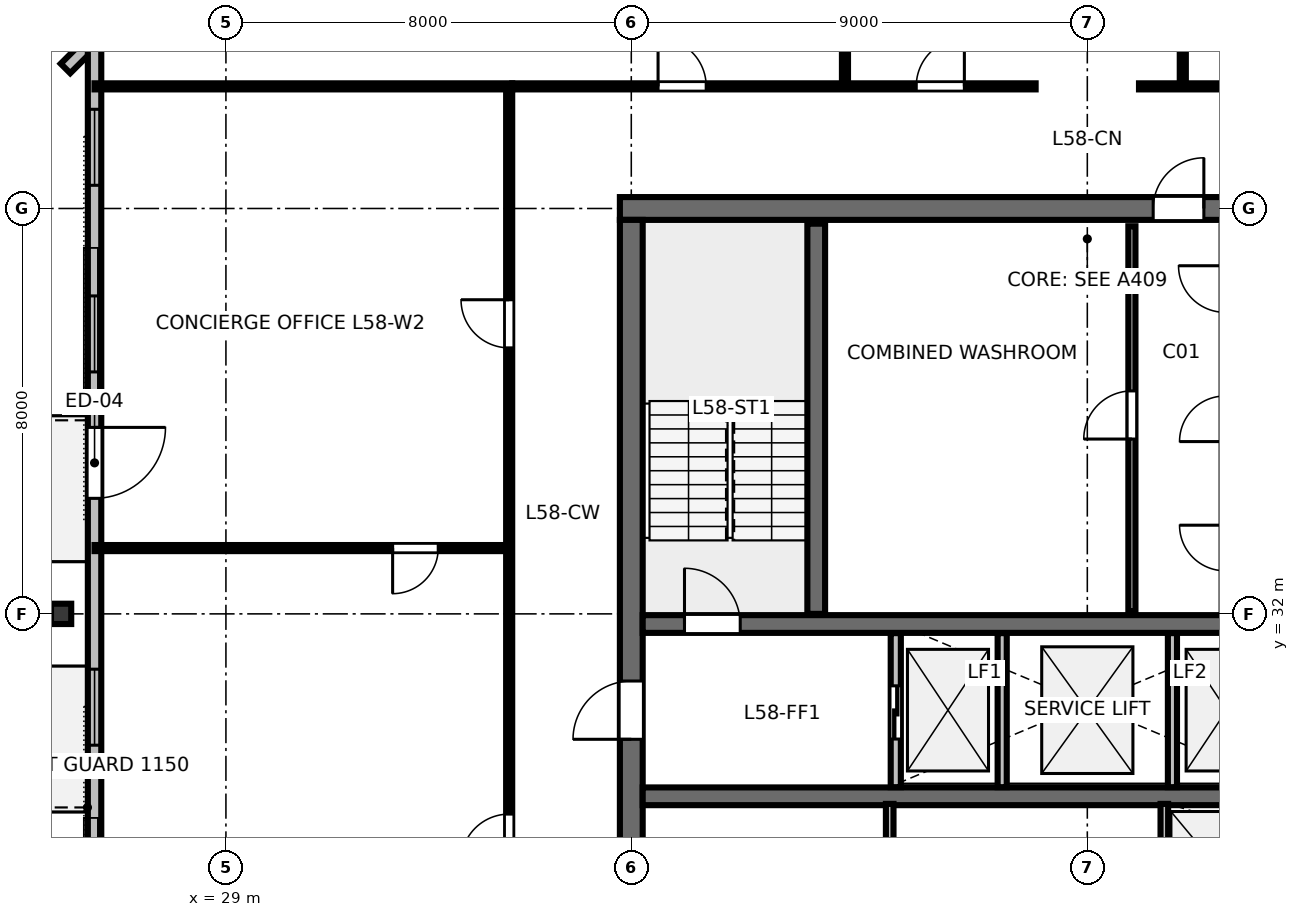
"""IFC4 building model, lengths in metres.
Left out: names, types, materials, properties, quantities, classifications, styles, units other than length and angle.
Written with IfcOpenShell. Run it as: python <this file> out.ifc"""

import sys

from ifc_helpers import new_model, si_unit, direction, frame, frame_2d, origin, origin_2d, place, context, subcontext, project, spatial, rectangle, i_section, extrude, element, fill, save


model = new_model("IFC4")
c1 = context("Model", 3, precision=1e-05, world=origin(), true_north=direction((0.0, 1.0)))
c2 = subcontext(c1, "Body", "Model", "MODEL_VIEW")
j1 = project(units=[si_unit("LENGTHUNIT", "METRE"), si_unit("PLANEANGLEUNIT", "RADIAN")], contexts=[c1])
p1 = place(None, origin())
s1 = spatial("IfcSite", under=j1, at=p1, CompositionType="ELEMENT")
p2 = place(p1, origin())
s2 = spatial("IfcBuilding", under=s1, at=p2, CompositionType="ELEMENT")
p3 = place(p2, frame((0.0, 0.0, 220.2)))
s3 = spatial("IfcBuildingStorey", under=s2, at=p3, CompositionType="ELEMENT", Elevation=220.2)
p4 = place(p3, frame((36.775, 40.0, 0.0), z_axis=(0.0, 0.0, 1.0), x_axis=(1.0, 0.0, 0.0)))
e1 = element("IfcWall", 1, at=p4, inside=s3, PredefinedType="SHEAR", context=c2, shape_type="SweptSolid", body=[
    extrude(rectangle(XDim=18.45, YDim=0.45, at=frame_2d((9.225, 0.0))), origin(), (0.0, 0.0, 1.0), 3.36),
])
p5 = place(p4, frame((10.525, 0.0, 0.0)))
e2 = element("IfcOpeningElement", 2, at=p5, cuts=e1, PredefinedType="OPENING", context=c2, shape_type="SweptSolid", body=[
    extrude(rectangle(XDim=1.0, YDim=2.15, at=frame_2d((0.5, 1.075))), frame((0.0, 0.235, 0.0), z_axis=(0.0, -1.0, 0.0), x_axis=(1.0, 0.0, 0.0)), (0.0, 0.0, 1.0), 0.47),
])
p6 = place(p3, frame((37.0, 24.225, 0.0), z_axis=(0.0, 0.0, 1.0), x_axis=(0.0, 1.0, 0.0)))
e3 = element("IfcWall", 3, at=p6, inside=s3, PredefinedType="SHEAR", context=c2, shape_type="SweptSolid", body=[
    extrude(rectangle(XDim=15.55, YDim=0.45, at=frame_2d((7.775, 0.0))), origin(), (0.0, 0.0, 1.0), 3.36),
])
p7 = place(p6, frame((5.3, 0.0, 0.0)))
e4 = element("IfcOpeningElement", 4, at=p7, cuts=e3, PredefinedType="OPENING", context=c2, shape_type="SweptSolid", body=[
    extrude(rectangle(XDim=1.15, YDim=2.15, at=frame_2d((0.575, 1.075))), frame((0.0, 0.235, 0.0), z_axis=(0.0, -1.0, 0.0), x_axis=(1.0, 0.0, 0.0)), (0.0, 0.0, 1.0), 0.47),
])
p8 = place(p3, frame((37.225, 31.8, 0.0), z_axis=(0.0, 0.0, 1.0), x_axis=(1.0, 0.0, 0.0)))
e5 = element("IfcWall", 5, at=p8, inside=s3, PredefinedType="SHEAR", context=c2, shape_type="SweptSolid", body=[
    extrude(rectangle(XDim=17.55, YDim=0.35, at=frame_2d((8.775, 0.0))), origin(), (0.0, 0.0, 1.0), 3.36),
])
p9 = place(p8, frame((0.825, 0.0, 0.0)))
e6 = element("IfcOpeningElement", 6, at=p9, cuts=e5, PredefinedType="OPENING", context=c2, shape_type="SweptSolid", body=[
    extrude(rectangle(XDim=1.1, YDim=2.15, at=frame_2d((0.55, 1.075))), frame((0.0, 0.185, 0.0), z_axis=(0.0, -1.0, 0.0), x_axis=(1.0, 0.0, 0.0)), (0.0, 0.0, 1.0), 0.37),
])
p10 = place(p8, frame((14.725, 0.0, 0.0)))
e7 = element("IfcOpeningElement", 7, at=p10, cuts=e5, PredefinedType="OPENING", context=c2, shape_type="SweptSolid", body=[
    extrude(rectangle(XDim=1.1, YDim=2.15, at=frame_2d((0.55, 1.075))), frame((0.0, 0.185, 0.0), z_axis=(0.0, -1.0, 0.0), x_axis=(1.0, 0.0, 0.0)), (0.0, 0.0, 1.0), 0.37),
])
p11 = place(p3, frame((37.225, 28.4, 0.0), z_axis=(0.0, 0.0, 1.0), x_axis=(1.0, 0.0, 0.0)))
e8 = element("IfcWall", 8, at=p11, inside=s3, PredefinedType="SHEAR", context=c2, shape_type="SweptSolid", body=[
    extrude(rectangle(XDim=17.55, YDim=0.35, at=frame_2d((8.775, 0.0))), origin(), (0.0, 0.0, 1.0), 3.36),
])
p12 = place(p3, frame((25.747, 32.0, 0.0), z_axis=(0.0, 0.0, 1.0), x_axis=(0.0, 1.0, 0.0)))
e9 = element("IfcColumn", 9, at=p12, inside=s3, PredefinedType="COLUMN", context=c2, shape_type="SweptSolid", body=[
    extrude(i_section(OverallWidth=0.401, OverallDepth=0.399, WebThickness=0.025, FlangeThickness=0.04, FilletRadius=0.025, at=origin_2d()), origin(), (0.0, 0.0, 1.0), 3.373),
])
p13 = place(p3, frame((33.191, 50.121, 0.0), z_axis=(0.0, 0.0, 1.0), x_axis=(-0.707106781187, -0.707106781187, 0.0)))
e10 = element("IfcWall", 10, at=p13, inside=s3, PredefinedType="STANDARD", context=c2, shape_type="SweptSolid", body=[
    extrude(rectangle(XDim=10.405, YDim=0.265, at=frame_2d((5.203, 0.0))), origin(), (0.0, 0.0, 1.0), 3.375),
])
p14 = place(p3, frame((26.407, 44.149, 0.0), z_axis=(0.0, 0.0, 1.0), x_axis=(0.0, -1.0, 0.0)))
e11 = element("IfcWall", 11, at=p14, inside=s3, PredefinedType="STANDARD", context=c2, shape_type="SweptSolid", body=[
    extrude(rectangle(XDim=24.298, YDim=0.265, at=frame_2d((12.149, 0.0))), origin(), (0.0, 0.0, 1.0), 3.375),
])
p15 = place(p14, frame((8.469, 0.0, 0.0)))
e12 = element("IfcOpeningElement", 12, at=p15, cuts=e11, PredefinedType="OPENING", context=c2, shape_type="SweptSolid", body=[
    extrude(rectangle(XDim=1.4, YDim=2.15, at=frame_2d((0.7, 1.075))), frame((0.0, 0.142, 0.0), z_axis=(0.0, -1.0, 0.0), x_axis=(1.0, 0.0, 0.0)), (0.0, 0.0, 1.0), 0.285),
])
p16 = place(p14, frame((2.191, 0.0, 0.85)))
e13 = element("IfcOpeningElement", 13, at=p16, cuts=e11, PredefinedType="OPENING", context=c2, shape_type="SweptSolid", body=[
    extrude(rectangle(XDim=1.5, YDim=1.85, at=frame_2d((0.75, 0.925))), frame((0.0, 0.142, 0.0), z_axis=(0.0, -1.0, 0.0), x_axis=(1.0, 0.0, 0.0)), (0.0, 0.0, 1.0), 0.285),
])
p17 = place(p14, frame((5.875, 0.0, 0.85)))
e14 = element("IfcOpeningElement", 14, at=p17, cuts=e11, PredefinedType="OPENING", context=c2, shape_type="SweptSolid", body=[
    extrude(rectangle(XDim=1.5, YDim=1.85, at=frame_2d((0.75, 0.925))), frame((0.0, 0.142, 0.0), z_axis=(0.0, -1.0, 0.0), x_axis=(1.0, 0.0, 0.0)), (0.0, 0.0, 1.0), 0.285),
])
p18 = place(p14, frame((13.24, 0.0, 0.85)))
e15 = element("IfcOpeningElement", 15, at=p18, cuts=e11, PredefinedType="OPENING", context=c2, shape_type="SweptSolid", body=[
    extrude(rectangle(XDim=1.5, YDim=1.85, at=frame_2d((0.75, 0.925))), frame((0.0, 0.142, 0.0), z_axis=(0.0, -1.0, 0.0), x_axis=(1.0, 0.0, 0.0)), (0.0, 0.0, 1.0), 0.285),
])
p19 = place(p14, frame((16.924, 0.0, 0.85)))
e16 = element("IfcOpeningElement", 16, at=p19, cuts=e11, PredefinedType="OPENING", context=c2, shape_type="SweptSolid", body=[
    extrude(rectangle(XDim=1.5, YDim=1.85, at=frame_2d((0.75, 0.925))), frame((0.0, 0.142, 0.0), z_axis=(0.0, -1.0, 0.0), x_axis=(1.0, 0.0, 0.0)), (0.0, 0.0, 1.0), 0.285),
])
p20 = place(p14, frame((20.607, 0.0, 0.85)))
e17 = element("IfcOpeningElement", 17, at=p20, cuts=e11, PredefinedType="OPENING", context=c2, shape_type="SweptSolid", body=[
    extrude(rectangle(XDim=1.5, YDim=1.85, at=frame_2d((0.75, 0.925))), frame((0.0, 0.142, 0.0), z_axis=(0.0, -1.0, 0.0), x_axis=(1.0, 0.0, 0.0)), (0.0, 0.0, 1.0), 0.285),
])
p21 = place(p3, frame((40.65, 32.0, 0.0), z_axis=(0.0, 0.0, 1.0), x_axis=(0.0, 1.0, 0.0)))
e18 = element("IfcWall", 18, at=p21, inside=s3, PredefinedType="SHEAR", context=c2, shape_type="SweptSolid", body=[
    extrude(rectangle(XDim=7.7, YDim=0.35, at=frame_2d((3.85, 0.0))), origin(), (0.0, 0.0, 1.0), 3.6),
])
p22 = place(p3, frame((46.88, 32.05, 0.0), z_axis=(0.0, 0.0, 1.0), x_axis=(0.0, 1.0, 0.0)))
e19 = element("IfcWall", 19, at=p22, inside=s3, PredefinedType="PARTITIONING", context=c2, shape_type="SweptSolid", body=[
    extrude(rectangle(XDim=7.6, YDim=0.14, at=frame_2d((3.8, 0.0))), origin(), (0.0, 0.0, 1.0), 3.375),
])
p23 = place(p22, frame((3.4, 0.0, 0.0)))
e20 = element("IfcOpeningElement", 20, at=p23, cuts=e19, PredefinedType="OPENING", context=c2, shape_type="SweptSolid", body=[
    extrude(rectangle(XDim=0.95, YDim=2.15, at=frame_2d((0.475, 1.075))), frame((0.0, 0.08, 0.0), z_axis=(0.0, -1.0, 0.0), x_axis=(1.0, 0.0, 0.0)), (0.0, 0.0, 1.0), 0.16),
])
p24 = place(p3, frame((42.22, 28.58, 0.0), z_axis=(0.0, 0.0, 1.0), x_axis=(0.0, 1.0, 0.0)))
e21 = element("IfcWall", 21, at=p24, inside=s3, PredefinedType="PARTITIONING", context=c2, shape_type="SweptSolid", body=[
    extrude(rectangle(XDim=3.04, YDim=0.2, at=frame_2d((1.52, 0.0))), origin(), (0.0, 0.0, 1.0), 3.375),
])
p25 = place(p24, frame((0.95, 0.0, 0.0)))
e22 = element("IfcOpeningElement", 22, at=p25, cuts=e21, PredefinedType="OPENING", context=c2, shape_type="SweptSolid", body=[
    extrude(rectangle(XDim=1.05, YDim=2.15, at=frame_2d((0.525, 1.075))), frame((0.0, 0.11, 0.0), z_axis=(0.0, -1.0, 0.0), x_axis=(1.0, 0.0, 0.0)), (0.0, 0.0, 1.0), 0.22),
])
for number, where, z_axis, x_axis in (
    (23, (44.32, 28.58, 0.0), (0.0, 0.0, 1.0), (0.0, 1.0, 0.0)),
    (24, (47.68, 28.58, 0.0), (0.0, 0.0, 1.0), (0.0, 1.0, 0.0)),
):
    element("IfcWall", number, at=place(p3, frame(where, z_axis=z_axis, x_axis=x_axis)), inside=s3, PredefinedType="PARTITIONING", context=c2, shape_type="SweptSolid", body=[
        extrude(rectangle(XDim=3.04, YDim=0.18, at=frame_2d((1.52, 0.0))), origin(), (0.0, 0.0, 1.0), 3.375),
    ])
p26 = place(p3, frame((42.1, 24.35, 0.0), z_axis=(0.0, 0.0, 1.0), x_axis=(0.0, 1.0, 0.0)))
e25 = element("IfcWall", 25, at=p26, inside=s3, PredefinedType="PARTITIONING", context=c2, shape_type="SweptSolid", body=[
    extrude(rectangle(XDim=3.9, YDim=0.15, at=frame_2d((1.95, 0.0))), origin(), (0.0, 0.0, 1.0), 3.375),
])
p27 = place(p26, frame((1.5, 0.0, 0.0)))
e26 = element("IfcOpeningElement", 26, at=p27, cuts=e25, PredefinedType="OPENING", context=c2, shape_type="SweptSolid", body=[
    extrude(rectangle(XDim=0.9, YDim=2.15, at=frame_2d((0.45, 1.075))), frame((0.0, 0.085, 0.0), z_axis=(0.0, -1.0, 0.0), x_axis=(1.0, 0.0, 0.0)), (0.0, 0.0, 1.0), 0.17),
])
p28 = place(p3, frame((47.52, 24.35, 0.0), z_axis=(0.0, 0.0, 1.0), x_axis=(0.0, 1.0, 0.0)))
e27 = element("IfcWall", 27, at=p28, inside=s3, PredefinedType="PARTITIONING", context=c2, shape_type="SweptSolid", body=[
    extrude(rectangle(XDim=3.9, YDim=0.15, at=frame_2d((1.95, 0.0))), origin(), (0.0, 0.0, 1.0), 3.375),
])
p29 = place(p28, frame((0.35, 0.0, 0.0)))
e28 = element("IfcOpeningElement", 28, at=p29, cuts=e27, PredefinedType="OPENING", context=c2, shape_type="SweptSolid", body=[
    extrude(rectangle(XDim=0.9, YDim=2.15, at=frame_2d((0.45, 1.075))), frame((0.0, 0.085, 0.0), z_axis=(0.0, -1.0, 0.0), x_axis=(1.0, 0.0, 0.0)), (0.0, 0.0, 1.0), 0.17),
])
p30 = place(p3, frame((41.217, 42.41, 0.0), z_axis=(0.0, 0.0, 1.0), x_axis=(0.0, 1.0, 0.0)))
e29 = element("IfcWall", 29, at=p30, inside=s3, PredefinedType="PARTITIONING", context=c2, shape_type="SweptSolid", body=[
    extrude(rectangle(XDim=7.137, YDim=0.12, at=frame_2d((3.569, 0.0))), origin(), (0.0, 0.0, 1.0), 2.655),
])
p31 = place(p30, frame((1.4, 0.0, 0.0)))
e30 = element("IfcOpeningElement", 30, at=p31, cuts=e29, PredefinedType="OPENING", context=c2, shape_type="SweptSolid", body=[
    extrude(rectangle(XDim=0.9, YDim=2.15, at=frame_2d((0.45, 1.075))), frame((0.0, 0.07, 0.0), z_axis=(0.0, -1.0, 0.0), x_axis=(1.0, 0.0, 0.0)), (0.0, 0.0, 1.0), 0.14),
])
p32 = place(p3, frame((47.885, 42.41, 0.0), z_axis=(0.0, 0.0, 1.0), x_axis=(0.0, 1.0, 0.0)))
e31 = element("IfcWall", 31, at=p32, inside=s3, PredefinedType="PARTITIONING", context=c2, shape_type="SweptSolid", body=[
    extrude(rectangle(XDim=7.137, YDim=0.12, at=frame_2d((3.569, 0.0))), origin(), (0.0, 0.0, 1.0), 2.655),
])
p33 = place(p32, frame((1.4, 0.0, 0.0)))
e32 = element("IfcOpeningElement", 32, at=p33, cuts=e31, PredefinedType="OPENING", context=c2, shape_type="SweptSolid", body=[
    extrude(rectangle(XDim=0.9, YDim=2.15, at=frame_2d((0.45, 1.075))), frame((0.0, 0.07, 0.0), z_axis=(0.0, -1.0, 0.0), x_axis=(1.0, 0.0, 0.0)), (0.0, 0.0, 1.0), 0.14),
])
p34 = place(p3, frame((34.65, 42.41, 0.0), z_axis=(0.0, 0.0, 1.0), x_axis=(1.0, 0.0, 0.0)))
e33 = element("IfcWall", 33, at=p34, inside=s3, PredefinedType="PARTITIONING", context=c2, shape_type="SweptSolid", body=[
    extrude(rectangle(XDim=10.33, YDim=0.12, at=frame_2d((5.165, 0.0))), origin(), (0.0, 0.0, 1.0), 2.655),
])
p35 = place(p34, frame((2.878, 0.0, 0.0)))
e34 = element("IfcOpeningElement", 34, at=p35, cuts=e33, PredefinedType="OPENING", context=c2, shape_type="SweptSolid", body=[
    extrude(rectangle(XDim=0.95, YDim=2.15, at=frame_2d((0.475, 1.075))), frame((0.0, 0.07, 0.0), z_axis=(0.0, -1.0, 0.0), x_axis=(1.0, 0.0, 0.0)), (0.0, 0.0, 1.0), 0.14),
])
p36 = place(p34, frame((7.974, 0.0, 0.0)))
e35 = element("IfcOpeningElement", 35, at=p36, cuts=e33, PredefinedType="OPENING", context=c2, shape_type="SweptSolid", body=[
    extrude(rectangle(XDim=0.95, YDim=2.15, at=frame_2d((0.475, 1.075))), frame((0.0, 0.07, 0.0), z_axis=(0.0, -1.0, 0.0), x_axis=(1.0, 0.0, 0.0)), (0.0, 0.0, 1.0), 0.14),
])
p37 = place(p3, frame((47.02, 42.41, 0.0), z_axis=(0.0, 0.0, 1.0), x_axis=(1.0, 0.0, 0.0)))
e36 = element("IfcWall", 36, at=p37, inside=s3, PredefinedType="PARTITIONING", context=c2, shape_type="SweptSolid", body=[
    extrude(rectangle(XDim=10.33, YDim=0.12, at=frame_2d((5.165, 0.0))), origin(), (0.0, 0.0, 1.0), 2.655),
])
p38 = place(p37, frame((1.846, 0.0, 0.0)))
e37 = element("IfcOpeningElement", 37, at=p38, cuts=e36, PredefinedType="OPENING", context=c2, shape_type="SweptSolid", body=[
    extrude(rectangle(XDim=0.95, YDim=2.15, at=frame_2d((0.475, 1.075))), frame((0.0, 0.07, 0.0), z_axis=(0.0, -1.0, 0.0), x_axis=(1.0, 0.0, 0.0)), (0.0, 0.0, 1.0), 0.14),
])
p39 = place(p37, frame((6.509, 0.0, 0.0)))
e38 = element("IfcOpeningElement", 38, at=p39, cuts=e36, PredefinedType="OPENING", context=c2, shape_type="SweptSolid", body=[
    extrude(rectangle(XDim=0.95, YDim=2.15, at=frame_2d((0.475, 1.075))), frame((0.0, 0.07, 0.0), z_axis=(0.0, -1.0, 0.0), x_axis=(1.0, 0.0, 0.0)), (0.0, 0.0, 1.0), 0.14),
])
p40 = place(p3, frame((34.59, 33.299, 0.0), z_axis=(0.0, 0.0, 1.0), x_axis=(-1.0, 0.0, 0.0)))
e39 = element("IfcWall", 39, at=p40, inside=s3, PredefinedType="PARTITIONING", context=c2, shape_type="SweptSolid", body=[
    extrude(rectangle(XDim=8.183, YDim=0.12, at=frame_2d((4.091, 0.0))), origin(), (0.0, 0.0, 1.0), 2.655),
])
p41 = place(p40, frame((1.4, 0.0, 0.0)))
e40 = element("IfcOpeningElement", 40, at=p41, cuts=e39, PredefinedType="OPENING", context=c2, shape_type="SweptSolid", body=[
    extrude(rectangle(XDim=0.9, YDim=2.15, at=frame_2d((0.45, 1.075))), frame((0.0, 0.07, 0.0), z_axis=(0.0, -1.0, 0.0), x_axis=(1.0, 0.0, 0.0)), (0.0, 0.0, 1.0), 0.14),
])
p42 = place(p3, frame((34.59, 21.65, 0.0), z_axis=(0.0, 0.0, 1.0), x_axis=(0.0, 1.0, 0.0)))
e41 = element("IfcWall", 41, at=p42, inside=s3, PredefinedType="PARTITIONING", context=c2, shape_type="SweptSolid", body=[
    extrude(rectangle(XDim=20.7, YDim=0.12, at=frame_2d((10.35, 0.0))), origin(), (0.0, 0.0, 1.0), 2.655),
])
p43 = place(p42, frame((5.449, 0.0, 0.0)))
e42 = element("IfcOpeningElement", 42, at=p43, cuts=e41, PredefinedType="OPENING", context=c2, shape_type="SweptSolid", body=[
    extrude(rectangle(XDim=0.95, YDim=2.15, at=frame_2d((0.475, 1.075))), frame((0.0, 0.07, 0.0), z_axis=(0.0, -1.0, 0.0), x_axis=(1.0, 0.0, 0.0)), (0.0, 0.0, 1.0), 0.14),
])
p44 = place(p42, frame((15.599, 0.0, 0.0)))
e43 = element("IfcOpeningElement", 43, at=p44, cuts=e41, PredefinedType="OPENING", context=c2, shape_type="SweptSolid", body=[
    extrude(rectangle(XDim=0.95, YDim=2.15, at=frame_2d((0.475, 1.075))), frame((0.0, 0.07, 0.0), z_axis=(0.0, -1.0, 0.0), x_axis=(1.0, 0.0, 0.0)), (0.0, 0.0, 1.0), 0.14),
])
p45 = place(p3, frame((34.65, 42.41, 0.0), z_axis=(0.0, 0.0, 1.0), x_axis=(-1.0, 0.0, 0.0)))
e44 = element("IfcWall", 44, at=p45, inside=s3, PredefinedType="PARTITIONING", context=c2, shape_type="SweptSolid", body=[
    extrude(rectangle(XDim=8.243, YDim=0.12, at=frame_2d((4.121, 0.0))), origin(), (0.0, 0.0, 1.0), 2.655),
])
p46 = place(p15, origin())
e45 = element("IfcDoor", 45, at=p46, inside=s3, OperationType="SINGLE_SWING_LEFT", PredefinedType="DOOR", context=c2, shape_type="SweptSolid", body=[
    extrude(rectangle(XDim=1.4, YDim=2.15, at=frame_2d((0.7, 1.075))), frame((0.0, 0.025, 0.0), z_axis=(0.0, -1.0, 0.0), x_axis=(1.0, 0.0, 0.0)), (0.0, 0.0, 1.0), 0.05),
])
fill(e12, e45)
p47 = place(p16, origin())
e46 = element("IfcWindow", 46, at=p47, inside=s3, PartitioningType="SINGLE_PANEL", PredefinedType="WINDOW", context=c2, shape_type="SweptSolid", body=[
    extrude(rectangle(XDim=1.5, YDim=1.85, at=frame_2d((0.75, 0.925))), frame((0.0, 0.03, 0.0), z_axis=(0.0, -1.0, 0.0), x_axis=(1.0, 0.0, 0.0)), (0.0, 0.0, 1.0), 0.06),
])
fill(e13, e46)
p48 = place(p17, origin())
e47 = element("IfcWindow", 47, at=p48, inside=s3, PartitioningType="SINGLE_PANEL", PredefinedType="WINDOW", context=c2, shape_type="SweptSolid", body=[
    extrude(rectangle(XDim=1.5, YDim=1.85, at=frame_2d((0.75, 0.925))), frame((0.0, 0.03, 0.0), z_axis=(0.0, -1.0, 0.0), x_axis=(1.0, 0.0, 0.0)), (0.0, 0.0, 1.0), 0.06),
])
fill(e14, e47)
p49 = place(p18, origin())
e48 = element("IfcWindow", 48, at=p49, inside=s3, PartitioningType="SINGLE_PANEL", PredefinedType="WINDOW", context=c2, shape_type="SweptSolid", body=[
    extrude(rectangle(XDim=1.5, YDim=1.85, at=frame_2d((0.75, 0.925))), frame((0.0, 0.03, 0.0), z_axis=(0.0, -1.0, 0.0), x_axis=(1.0, 0.0, 0.0)), (0.0, 0.0, 1.0), 0.06),
])
fill(e15, e48)
p50 = place(p9, origin())
e49 = element("IfcDoor", 49, at=p50, inside=s3, OperationType="SINGLE_SWING_LEFT", PredefinedType="DOOR", context=c2, shape_type="SweptSolid", body=[
    extrude(rectangle(XDim=1.1, YDim=2.15, at=frame_2d((0.55, 1.075))), frame((0.0, 0.025, 0.0), z_axis=(0.0, -1.0, 0.0), x_axis=(1.0, 0.0, 0.0)), (0.0, 0.0, 1.0), 0.05),
])
fill(e6, e49)
p51 = place(p5, origin())
e50 = element("IfcDoor", 50, at=p51, inside=s3, OperationType="SINGLE_SWING_RIGHT", PredefinedType="DOOR", context=c2, shape_type="SweptSolid", body=[
    extrude(rectangle(XDim=1.0, YDim=2.15, at=frame_2d((0.5, 1.075))), frame((0.0, 0.025, 0.0), z_axis=(0.0, -1.0, 0.0), x_axis=(1.0, 0.0, 0.0)), (0.0, 0.0, 1.0), 0.05),
])
fill(e2, e50)
p52 = place(p7, origin())
e51 = element("IfcDoor", 51, at=p52, inside=s3, OperationType="SINGLE_SWING_LEFT", PredefinedType="DOOR", context=c2, shape_type="SweptSolid", body=[
    extrude(rectangle(XDim=1.15, YDim=2.15, at=frame_2d((0.575, 1.075))), frame((0.0, 0.025, 0.0), z_axis=(0.0, -1.0, 0.0), x_axis=(1.0, 0.0, 0.0)), (0.0, 0.0, 1.0), 0.05),
])
fill(e4, e51)
p53 = place(p23, origin())
e52 = element("IfcDoor", 52, at=p53, inside=s3, OperationType="SINGLE_SWING_LEFT", PredefinedType="DOOR", context=c2, shape_type="SweptSolid", body=[
    extrude(rectangle(XDim=0.95, YDim=2.15, at=frame_2d((0.475, 1.075))), frame((0.0, 0.025, 0.0), z_axis=(0.0, -1.0, 0.0), x_axis=(1.0, 0.0, 0.0)), (0.0, 0.0, 1.0), 0.05),
])
fill(e20, e52)
p54 = place(p25, origin())
e53 = element("IfcDoor", 53, at=p54, inside=s3, OperationType="SLIDING_TO_LEFT", PredefinedType="DOOR", context=c2, shape_type="SweptSolid", body=[
    extrude(rectangle(XDim=1.05, YDim=2.15, at=frame_2d((0.525, 1.075))), frame((0.0, 0.025, 0.0), z_axis=(0.0, -1.0, 0.0), x_axis=(1.0, 0.0, 0.0)), (0.0, 0.0, 1.0), 0.05),
])
fill(e22, e53)
p55 = place(p35, origin())
e54 = element("IfcDoor", 54, at=p55, inside=s3, OperationType="SINGLE_SWING_LEFT", PredefinedType="DOOR", context=c2, shape_type="SweptSolid", body=[
    extrude(rectangle(XDim=0.95, YDim=2.15, at=frame_2d((0.475, 1.075))), frame((0.0, 0.025, 0.0), z_axis=(0.0, -1.0, 0.0), x_axis=(1.0, 0.0, 0.0)), (0.0, 0.0, 1.0), 0.05),
])
fill(e34, e54)
p56 = place(p36, origin())
e55 = element("IfcDoor", 55, at=p56, inside=s3, OperationType="SINGLE_SWING_RIGHT", PredefinedType="DOOR", context=c2, shape_type="SweptSolid", body=[
    extrude(rectangle(XDim=0.95, YDim=2.15, at=frame_2d((0.475, 1.075))), frame((0.0, 0.025, 0.0), z_axis=(0.0, -1.0, 0.0), x_axis=(1.0, 0.0, 0.0)), (0.0, 0.0, 1.0), 0.05),
])
fill(e35, e55)
p57 = place(p41, origin())
e56 = element("IfcDoor", 56, at=p57, inside=s3, OperationType="SINGLE_SWING_RIGHT", PredefinedType="DOOR", context=c2, shape_type="SweptSolid", body=[
    extrude(rectangle(XDim=0.9, YDim=2.15, at=frame_2d((0.45, 1.075))), frame((0.0, 0.025, 0.0), z_axis=(0.0, -1.0, 0.0), x_axis=(1.0, 0.0, 0.0)), (0.0, 0.0, 1.0), 0.05),
])
fill(e40, e56)
p58 = place(p43, origin())
e57 = element("IfcDoor", 57, at=p58, inside=s3, OperationType="SINGLE_SWING_LEFT", PredefinedType="DOOR", context=c2, shape_type="SweptSolid", body=[
    extrude(rectangle(XDim=0.95, YDim=2.15, at=frame_2d((0.475, 1.075))), frame((0.0, 0.025, 0.0), z_axis=(0.0, -1.0, 0.0), x_axis=(1.0, 0.0, 0.0)), (0.0, 0.0, 1.0), 0.05),
])
fill(e42, e57)
p59 = place(p44, origin())
e58 = element("IfcDoor", 58, at=p59, inside=s3, OperationType="SINGLE_SWING_RIGHT", PredefinedType="DOOR", context=c2, shape_type="SweptSolid", body=[
    extrude(rectangle(XDim=0.95, YDim=2.15, at=frame_2d((0.475, 1.075))), frame((0.0, 0.025, 0.0), z_axis=(0.0, -1.0, 0.0), x_axis=(1.0, 0.0, 0.0)), (0.0, 0.0, 1.0), 0.05),
])
fill(e43, e58)
save(model, sys.argv[1])
